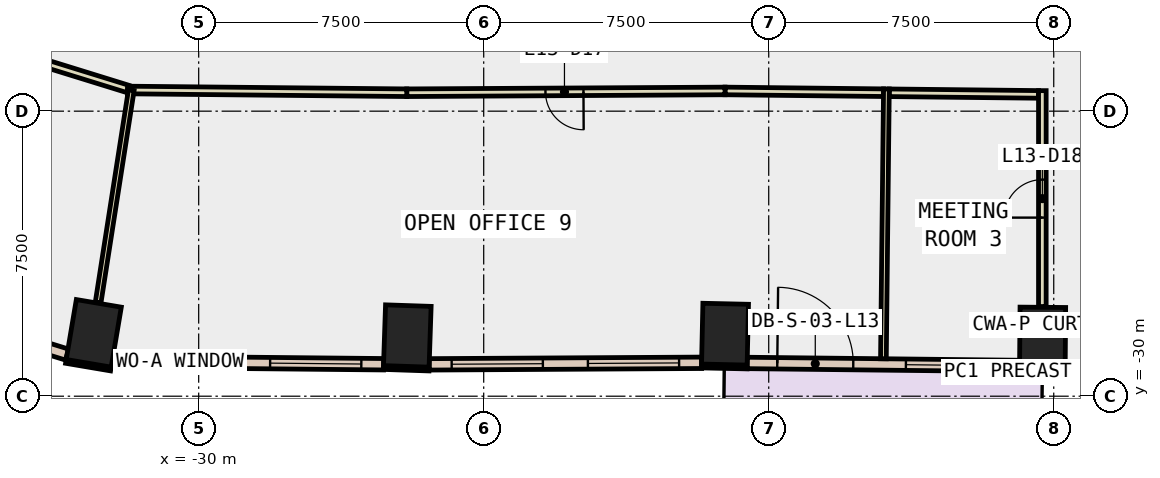
"""IFC4 building model, lengths in metres.
Left out: names, types, materials, properties, quantities, classifications, styles, units other than length and angle.
Written with IfcOpenShell. Run it as: python <this file> out.ifc"""

import sys

from ifc_helpers import new_model, si_unit, direction, frame, frame_2d, origin, origin_2d, place, context, subcontext, project, spatial, rectangle, extrude, element, fill, save


model = new_model("IFC4")
c1 = context("Model", 3, precision=1e-05, world=origin(), true_north=direction((0.0, 1.0)))
c2 = subcontext(c1, "Body", "Model", "MODEL_VIEW")
j1 = project(units=[si_unit("LENGTHUNIT", "METRE"), si_unit("PLANEANGLEUNIT", "RADIAN")], contexts=[c1])
p1 = place(None, origin())
s1 = spatial("IfcSite", under=j1, at=p1, CompositionType="ELEMENT")
p2 = place(p1, origin())
s2 = spatial("IfcBuilding", under=s1, at=p2, CompositionType="ELEMENT")
p3 = place(p2, frame((0.0, 0.0, 64.4)))
s3 = spatial("IfcBuildingStorey", under=s2, at=p3, CompositionType="ELEMENT", Elevation=64.4)
for number, where, z_axis, x_axis in (
    (1, (-32.761, -28.346, -0.4), (0.0, 0.0, 1.0), (-0.986, 0.167, 0.0)),
    (2, (-24.51, -28.416, -0.4), (0.0, 0.0, 1.0), (-0.999, 0.034, 0.0)),
    (3, (-16.15, -28.368, -0.4), (0.0, 0.0, 1.0), (-1.0, 0.022, 0.0)),
    (4, (-7.793, -28.461, -0.4), (0.0, 0.0, 1.0), (-1.0, 0.008, 0.0)),
):
    element("IfcColumn", number, at=place(p3, frame(where, z_axis=z_axis, x_axis=x_axis)), inside=s3, PredefinedType="COLUMN", context=c2, shape_type="SweptSolid", body=[
        extrude(rectangle(XDim=1.2, YDim=1.6, at=origin_2d()), origin(), (0.0, 0.0, 1.0), 4.2),
    ])
for number, where, z_axis, x_axis in (
    (5, (-33.494, -29.084, 0.0), (0.0, 0.0, 1.0), (0.986, -0.167, 0.0)),
    (6, (-25.138, -29.245, 0.0), (0.0, 0.0, 1.0), (0.999, -0.033, 0.0)),
):
    element("IfcWall", number, at=place(p3, frame(where, z_axis=z_axis, x_axis=x_axis)), inside=s3, PredefinedType="STANDARD", context=c2, shape_type="SweptSolid", body=[
        extrude(rectangle(XDim=1.2, YDim=0.1, at=frame_2d((0.6, 0.0))), origin(), (0.0, 0.0, 1.0), 3.8),
    ])
p4 = place(p3, frame((-16.769, -29.205, 0.0), z_axis=(0.0, 0.0, 1.0), x_axis=(0.99976752127, -0.021561618973, 0.0)))
e7 = element("IfcWall", 7, at=p4, inside=s3, PredefinedType="STANDARD", context=c2, shape_type="SweptSolid", body=[
    extrude(rectangle(XDim=1.2, YDim=0.1, at=frame_2d((0.6, 0.0))), origin(), (0.0, 0.0, 1.0), 3.8),
])
p5 = place(p3, frame((-8.4, -29.306, 0.0), z_axis=(0.0, 0.0, 1.0), x_axis=(0.999965208912, -0.008341520563, 0.0)))
e8 = element("IfcWall", 8, at=p5, inside=s3, PredefinedType="STANDARD", context=c2, shape_type="SweptSolid", body=[
    extrude(rectangle(XDim=1.2, YDim=0.1, at=frame_2d((0.6, 0.0))), origin(), (0.0, 0.0, 1.0), 3.8),
])
p6 = place(p3, frame((-32.279, -29.089, 0.0), z_axis=(0.0, 0.0, 1.0), x_axis=(0.999952253205, -0.009771965572, 0.0)))
e9 = element("IfcWall", 9, at=p6, inside=s3, PredefinedType="STANDARD", context=c2, shape_type="SweptSolid", body=[
    extrude(rectangle(XDim=7.145, YDim=0.3, at=frame_2d((3.573, 0.0))), origin(), (0.0, 0.0, 1.0), 3.8),
])
p7 = place(p6, frame((0.586, 0.0, 0.9)))
e10 = element("IfcOpeningElement", 10, at=p7, cuts=e9, PredefinedType="OPENING", context=c2, shape_type="SweptSolid", body=[
    extrude(rectangle(XDim=2.4, YDim=2.6, at=frame_2d((1.2, 1.3))), frame((0.0, 0.16, 0.0), z_axis=(0.0, -1.0, 0.0), x_axis=(1.0, 0.0, 0.0)), (0.0, 0.0, 1.0), 0.32),
])
p8 = place(p6, frame((4.159, 0.0, 0.9)))
e11 = element("IfcOpeningElement", 11, at=p8, cuts=e9, PredefinedType="OPENING", context=c2, shape_type="SweptSolid", body=[
    extrude(rectangle(XDim=2.4, YDim=2.6, at=frame_2d((1.2, 1.3))), frame((0.0, 0.16, 0.0), z_axis=(0.0, -1.0, 0.0), x_axis=(1.0, 0.0, 0.0)), (0.0, 0.0, 1.0), 0.32),
])
p9 = place(p3, frame((-23.936, -29.162, 0.0), z_axis=(0.0, 0.0, 1.0), x_axis=(0.999983638272, 0.005720418525, 0.0)))
e12 = element("IfcWall", 12, at=p9, inside=s3, PredefinedType="STANDARD", context=c2, shape_type="SweptSolid", body=[
    extrude(rectangle(XDim=7.17, YDim=0.3, at=frame_2d((3.585, 0.0))), origin(), (0.0, 0.0, 1.0), 3.8),
])
p10 = place(p9, frame((0.593, 0.0, 0.9)))
e13 = element("IfcOpeningElement", 13, at=p10, cuts=e12, PredefinedType="OPENING", context=c2, shape_type="SweptSolid", body=[
    extrude(rectangle(XDim=2.4, YDim=2.6, at=frame_2d((1.2, 1.3))), frame((0.0, 0.16, 0.0), z_axis=(0.0, -1.0, 0.0), x_axis=(1.0, 0.0, 0.0)), (0.0, 0.0, 1.0), 0.32),
])
p11 = place(p9, frame((4.178, 0.0, 0.9)))
e14 = element("IfcOpeningElement", 14, at=p11, cuts=e12, PredefinedType="OPENING", context=c2, shape_type="SweptSolid", body=[
    extrude(rectangle(XDim=2.4, YDim=2.6, at=frame_2d((1.2, 1.3))), frame((0.0, 0.16, 0.0), z_axis=(0.0, -1.0, 0.0), x_axis=(1.0, 0.0, 0.0)), (0.0, 0.0, 1.0), 0.32),
])
p12 = place(p3, frame((-15.568, -29.125, 0.0), z_axis=(0.0, 0.0, 1.0), x_axis=(0.999939152594, -0.011031369316, 0.0)))
e15 = element("IfcWall", 15, at=p12, inside=s3, PredefinedType="STANDARD", context=c2, shape_type="SweptSolid", body=[
    extrude(rectangle(XDim=7.171, YDim=0.3, at=frame_2d((3.585, 0.0))), origin(), (0.0, 0.0, 1.0), 3.8),
])
p13 = place(p12, frame((0.793, 0.0, 0.0)))
e16 = element("IfcOpeningElement", 16, at=p13, cuts=e15, PredefinedType="OPENING", context=c2, shape_type="SweptSolid", body=[
    extrude(rectangle(XDim=2.0, YDim=2.4, at=frame_2d((1.0, 1.2))), frame((0.0, 0.16, 0.0), z_axis=(0.0, -1.0, 0.0), x_axis=(1.0, 0.0, 0.0)), (0.0, 0.0, 1.0), 0.32),
])
p14 = place(p12, frame((4.178, 0.0, 0.9)))
e17 = element("IfcOpeningElement", 17, at=p14, cuts=e15, PredefinedType="OPENING", context=c2, shape_type="SweptSolid", body=[
    extrude(rectangle(XDim=2.4, YDim=2.6, at=frame_2d((1.2, 1.3))), frame((0.0, 0.16, 0.0), z_axis=(0.0, -1.0, 0.0), x_axis=(1.0, 0.0, 0.0)), (0.0, 0.0, 1.0), 0.32),
])
p15 = place(p3, frame((-37.254, -27.732, 0.0), z_axis=(0.0, 0.0, 1.0), x_axis=(0.955308230541, -0.295611543518, 0.0)))
e18 = element("IfcWall", 18, at=p15, inside=s3, PredefinedType="STANDARD", context=c2, shape_type="SweptSolid", body=[
    extrude(rectangle(XDim=3.968, YDim=0.3, at=frame_2d((1.984, 0.0))), origin(), (0.0, 0.0, 1.0), 3.8),
])
p16 = place(p15, frame((1.284, 0.0, 0.9)))
e19 = element("IfcOpeningElement", 19, at=p16, cuts=e18, PredefinedType="OPENING", context=c2, shape_type="SweptSolid", body=[
    extrude(rectangle(XDim=1.4, YDim=2.6, at=frame_2d((0.7, 1.3))), frame((0.0, 0.16, 0.0), z_axis=(0.0, -1.0, 0.0), x_axis=(1.0, 0.0, 0.0)), (0.0, 0.0, 1.0), 0.32),
])
p17 = place(p3, frame((-31.868, -21.914, 0.0), z_axis=(0.0, 0.0, 1.0), x_axis=(-0.955329505989, 0.295542780299, 0.0)))
e20 = element("IfcWall", 20, at=p17, inside=s3, PredefinedType="PARTITIONING", context=c2, shape_type="SweptSolid", body=[
    extrude(rectangle(XDim=2.484, YDim=0.2, at=frame_2d((1.242, 0.0))), origin(), (0.0, 0.0, 1.0), 3.8),
])
p18 = place(p3, frame((-11.979, -22.014, 0.0), z_axis=(0.0, 0.0, 1.0), x_axis=(-0.999939456554, 0.01100378236, 0.0)))
e21 = element("IfcWall", 21, at=p18, inside=s3, PredefinedType="PARTITIONING", context=c2, shape_type="SweptSolid", body=[
    extrude(rectangle(XDim=4.171, YDim=0.2, at=frame_2d((2.085, 0.0))), origin(), (0.0, 0.0, 1.0), 3.8),
])
p19 = place(p3, frame((-16.15, -21.968, 0.0), z_axis=(0.0, 0.0, 1.0), x_axis=(-0.99998433708, -0.00559692726, 0.0)))
e22 = element("IfcWall", 22, at=p19, inside=s3, PredefinedType="PARTITIONING", context=c2, shape_type="SweptSolid", body=[
    extrude(rectangle(XDim=8.375, YDim=0.2, at=frame_2d((4.188, 0.0))), origin(), (0.0, 0.0, 1.0), 3.8),
])
p20 = place(p19, frame((3.725, 0.0, 0.0)))
e23 = element("IfcOpeningElement", 23, at=p20, cuts=e22, PredefinedType="OPENING", context=c2, shape_type="SweptSolid", body=[
    extrude(rectangle(XDim=1.0, YDim=2.1, at=frame_2d((0.5, 1.05))), frame((0.0, 0.11, 0.0), z_axis=(0.0, -1.0, 0.0), x_axis=(1.0, 0.0, 0.0)), (0.0, 0.0, 1.0), 0.22),
])
p21 = place(p3, frame((-24.525, -22.015, 0.0), z_axis=(0.0, 0.0, 1.0), x_axis=(-0.999952295614, 0.009767624922, 0.0)))
e24 = element("IfcWall", 24, at=p21, inside=s3, PredefinedType="PARTITIONING", context=c2, shape_type="SweptSolid", body=[
    extrude(rectangle(XDim=7.348, YDim=0.2, at=frame_2d((3.674, 0.0))), origin(), (0.0, 0.0, 1.0), 3.8),
])
p22 = place(p3, frame((-7.9, -22.059, 0.0), z_axis=(0.0, 0.0, 1.0), x_axis=(-0.999940210022, 0.010935098606, 0.0)))
e25 = element("IfcWall", 25, at=p22, inside=s3, PredefinedType="PARTITIONING", context=c2, shape_type="SweptSolid", body=[
    extrude(rectangle(XDim=3.929, YDim=0.2, at=frame_2d((1.965, 0.0))), origin(), (0.0, 0.0, 1.0), 3.8),
])
p23 = place(p3, frame((-7.8, -27.641, 0.0), z_axis=(0.0, 0.0, 1.0), x_axis=(0.0, 1.0, 0.0)))
e26 = element("IfcWall", 26, at=p23, inside=s3, PredefinedType="PARTITIONING", context=c2, shape_type="SweptSolid", body=[
    extrude(rectangle(XDim=5.681, YDim=0.2, at=frame_2d((2.841, 0.0))), origin(), (0.0, 0.0, 1.0), 3.8),
])
p24 = place(p23, frame((2.34, 0.0, 0.0)))
e27 = element("IfcOpeningElement", 27, at=p24, cuts=e26, PredefinedType="OPENING", context=c2, shape_type="SweptSolid", body=[
    extrude(rectangle(XDim=1.0, YDim=2.1, at=frame_2d((0.5, 1.05))), frame((0.0, 0.11, 0.0), z_axis=(0.0, -1.0, 0.0), x_axis=(1.0, 0.0, 0.0)), (0.0, 0.0, 1.0), 0.22),
])
p25 = place(p3, frame((-31.773, -21.944, 0.0), z_axis=(0.0, 0.0, 1.0), x_axis=(-0.154313693693, -0.988021904585, 0.0)))
e28 = element("IfcWall", 28, at=p25, inside=s3, PredefinedType="PARTITIONING", context=c2, shape_type="SweptSolid", body=[
    extrude(rectangle(XDim=5.658, YDim=0.15, at=frame_2d((2.829, 0.0))), origin(), (0.0, 0.0, 1.0), 3.8),
])
p26 = place(p3, frame((-11.903, -21.915, 0.0), z_axis=(0.0, 0.0, 1.0), x_axis=(-0.011106223261, -0.999938324, 0.0)))
e29 = element("IfcWall", 29, at=p26, inside=s3, PredefinedType="PARTITIONING", context=c2, shape_type="SweptSolid", body=[
    extrude(rectangle(XDim=7.1, YDim=0.15, at=frame_2d((3.55, 0.0))), origin(), (0.0, 0.0, 1.0), 3.8),
])
p27 = place(p7, origin())
e30 = element("IfcWindow", 30, at=p27, inside=s3, PartitioningType="SINGLE_PANEL", PredefinedType="WINDOW", context=c2, shape_type="SweptSolid", body=[
    extrude(rectangle(XDim=2.4, YDim=2.6, at=frame_2d((1.2, 1.3))), frame((0.0, 0.03, 0.0), z_axis=(0.0, -1.0, 0.0), x_axis=(1.0, 0.0, 0.0)), (0.0, 0.0, 1.0), 0.06),
])
fill(e10, e30)
p28 = place(p8, origin())
e31 = element("IfcWindow", 31, at=p28, inside=s3, PartitioningType="SINGLE_PANEL", PredefinedType="WINDOW", context=c2, shape_type="SweptSolid", body=[
    extrude(rectangle(XDim=2.4, YDim=2.6, at=frame_2d((1.2, 1.3))), frame((0.0, 0.03, 0.0), z_axis=(0.0, -1.0, 0.0), x_axis=(1.0, 0.0, 0.0)), (0.0, 0.0, 1.0), 0.06),
])
fill(e11, e31)
p29 = place(p10, origin())
e32 = element("IfcWindow", 32, at=p29, inside=s3, PartitioningType="SINGLE_PANEL", PredefinedType="WINDOW", context=c2, shape_type="SweptSolid", body=[
    extrude(rectangle(XDim=2.4, YDim=2.6, at=frame_2d((1.2, 1.3))), frame((0.0, 0.03, 0.0), z_axis=(0.0, -1.0, 0.0), x_axis=(1.0, 0.0, 0.0)), (0.0, 0.0, 1.0), 0.06),
])
fill(e13, e32)
p30 = place(p11, origin())
e33 = element("IfcWindow", 33, at=p30, inside=s3, PartitioningType="SINGLE_PANEL", PredefinedType="WINDOW", context=c2, shape_type="SweptSolid", body=[
    extrude(rectangle(XDim=2.4, YDim=2.6, at=frame_2d((1.2, 1.3))), frame((0.0, 0.03, 0.0), z_axis=(0.0, -1.0, 0.0), x_axis=(1.0, 0.0, 0.0)), (0.0, 0.0, 1.0), 0.06),
])
fill(e14, e33)
p31 = place(p13, origin())
e34 = element("IfcDoor", 34, at=p31, inside=s3, OperationType="SLIDING_TO_LEFT", PredefinedType="DOOR", context=c2, shape_type="SweptSolid", body=[
    extrude(rectangle(XDim=2.0, YDim=2.4, at=frame_2d((1.0, 1.2))), frame((0.0, 0.025, 0.0), z_axis=(0.0, -1.0, 0.0), x_axis=(1.0, 0.0, 0.0)), (0.0, 0.0, 1.0), 0.05),
])
fill(e16, e34)
p32 = place(p14, origin())
e35 = element("IfcWindow", 35, at=p32, inside=s3, PartitioningType="SINGLE_PANEL", PredefinedType="WINDOW", context=c2, shape_type="SweptSolid", body=[
    extrude(rectangle(XDim=2.4, YDim=2.6, at=frame_2d((1.2, 1.3))), frame((0.0, 0.03, 0.0), z_axis=(0.0, -1.0, 0.0), x_axis=(1.0, 0.0, 0.0)), (0.0, 0.0, 1.0), 0.06),
])
fill(e17, e35)
p33 = place(p20, origin())
e36 = element("IfcDoor", 36, at=p33, inside=s3, OperationType="SINGLE_SWING_RIGHT", PredefinedType="DOOR", context=c2, shape_type="SweptSolid", body=[
    extrude(rectangle(XDim=1.0, YDim=2.1, at=frame_2d((0.5, 1.05))), frame((0.0, 0.025, 0.0), z_axis=(0.0, -1.0, 0.0), x_axis=(1.0, 0.0, 0.0)), (0.0, 0.0, 1.0), 0.05),
])
fill(e23, e36)
p34 = place(p24, origin())
e37 = element("IfcDoor", 37, at=p34, inside=s3, OperationType="SINGLE_SWING_LEFT", PredefinedType="DOOR", context=c2, shape_type="SweptSolid", body=[
    extrude(rectangle(XDim=1.0, YDim=2.1, at=frame_2d((0.5, 1.05))), frame((0.0, 0.025, 0.0), z_axis=(0.0, -1.0, 0.0), x_axis=(1.0, 0.0, 0.0)), (0.0, 0.0, 1.0), 0.05),
])
fill(e27, e37)
save(model, sys.argv[1])
